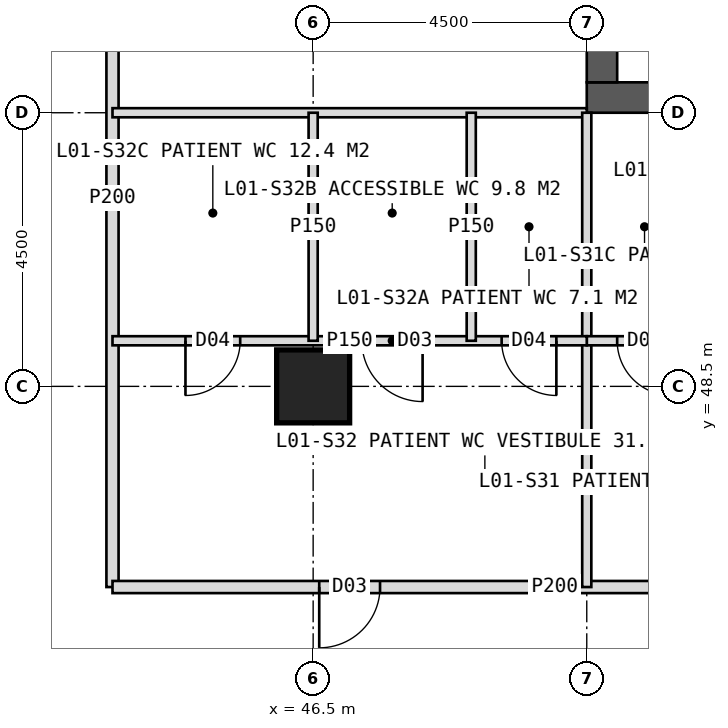
"""IFC4 building model, lengths in metres.
Left out: names, types, materials, properties, quantities, classifications, styles, units other than length and angle.
Written with IfcOpenShell. Run it as: python <this file> out.ifc"""

import sys

from ifc_helpers import new_model, si_unit, direction, frame, frame_2d, origin, origin_2d, place, context, subcontext, project, spatial, rectangle, hollow_rectangle, extrude, element, fill, save


model = new_model("IFC4")
c1 = context("Model", 3, precision=1e-05, world=origin(), true_north=direction((0.0, 1.0)))
c2 = subcontext(c1, "Body", "Model", "MODEL_VIEW")
j1 = project(units=[si_unit("LENGTHUNIT", "METRE"), si_unit("PLANEANGLEUNIT", "RADIAN")], contexts=[c1])
p1 = place(None, origin())
s1 = spatial("IfcSite", under=j1, at=p1, CompositionType="ELEMENT")
p2 = place(p1, origin())
s2 = spatial("IfcBuilding", under=s1, at=p2, CompositionType="ELEMENT")
p3 = place(p2, frame((0.0, 0.0, 6.0)))
s3 = spatial("IfcBuildingStorey", under=s2, at=p3, CompositionType="ELEMENT", Elevation=6.0)
p4 = place(p3, frame((51.0, 53.25, 0.0), z_axis=(0.0, 0.0, 1.0), x_axis=(1.0, 0.0, 0.0)))
e1 = element("IfcWall", 1, at=p4, inside=s3, PredefinedType="SHEAR", context=c2, shape_type="SweptSolid", body=[
    extrude(rectangle(XDim=18.0, YDim=0.5, at=frame_2d((9.0, 0.0))), origin(), (0.0, 0.0, 1.0), 5.0),
])
p5 = place(p4, frame((8.1, 0.0, 0.0)))
e2 = element("IfcOpeningElement", 2, at=p5, cuts=e1, PredefinedType="OPENING", context=c2, shape_type="SweptSolid", body=[
    extrude(rectangle(XDim=1.8, YDim=2.2, at=frame_2d((0.9, 1.1))), frame((0.0, 0.26, 0.0), z_axis=(0.0, -1.0, 0.0), x_axis=(1.0, 0.0, 0.0)), (0.0, 0.0, 1.0), 0.52),
])
p6 = place(p3, frame((51.25, 53.5, 0.0), z_axis=(0.0, 0.0, 1.0), x_axis=(0.0, 1.0, 0.0)))
e3 = element("IfcWall", 3, at=p6, inside=s3, PredefinedType="SHEAR", context=c2, shape_type="SweptSolid", body=[
    extrude(rectangle(XDim=17.0, YDim=0.5, at=frame_2d((8.5, 0.0))), origin(), (0.0, 0.0, 1.0), 5.0),
])
p7 = place(p6, frame((6.0, 0.0, 0.0)))
e4 = element("IfcOpeningElement", 4, at=p7, cuts=e3, PredefinedType="OPENING", context=c2, shape_type="SweptSolid", body=[
    extrude(rectangle(XDim=1.5, YDim=2.2, at=frame_2d((0.75, 1.1))), frame((0.0, 0.26, 0.0), z_axis=(0.0, -1.0, 0.0), x_axis=(1.0, 0.0, 0.0)), (0.0, 0.0, 1.0), 0.52),
])
p8 = place(p3, frame((46.5, 48.5, 0.0), z_axis=(0.0, 0.0, 1.0), x_axis=(1.0, 0.0, 0.0)))
e5 = element("IfcColumn", 5, at=p8, inside=s3, PredefinedType="COLUMN", context=c2, shape_type="SweptSolid", body=[
    extrude(hollow_rectangle(XDim=1.2, YDim=1.2, WallThickness=0.1, at=origin_2d()), origin(), (0.0, 0.0, 1.0), 5.0),
])
p9 = place(p3, frame((43.2, 45.2, 0.0), z_axis=(0.0, 0.0, 1.0), x_axis=(0.0, 1.0, 0.0)))
e6 = element("IfcWall", 6, at=p9, inside=s3, PredefinedType="PARTITIONING", context=c2, shape_type="SweptSolid", body=[
    extrude(rectangle(XDim=12.8, YDim=0.2, at=frame_2d((6.4, 0.0))), origin(), (0.0, 0.0, 1.0), 4.7),
])
p10 = place(p9, frame((9.8, 0.0, 0.0)))
e7 = element("IfcOpeningElement", 7, at=p10, cuts=e6, PredefinedType="OPENING", context=c2, shape_type="SweptSolid", body=[
    extrude(rectangle(XDim=1.0, YDim=2.1, at=frame_2d((0.5, 1.05))), frame((0.0, 0.11, 0.0), z_axis=(0.0, -1.0, 0.0), x_axis=(1.0, 0.0, 0.0)), (0.0, 0.0, 1.0), 0.22),
])
p11 = place(p3, frame((51.0, 53.0, 0.0), z_axis=(0.0, 0.0, 1.0), x_axis=(-1.0, 0.0, 0.0)))
e8 = element("IfcWall", 8, at=p11, inside=s3, PredefinedType="PARTITIONING", context=c2, shape_type="SweptSolid", body=[
    extrude(rectangle(XDim=7.8, YDim=0.15, at=frame_2d((3.9, 0.0))), origin(), (0.0, 0.0, 1.0), 4.7),
])
p12 = place(p3, frame((57.75, 45.2, 0.0), z_axis=(0.0, 0.0, 1.0), x_axis=(-1.0, 0.0, 0.0)))
e9 = element("IfcWall", 9, at=p12, inside=s3, PredefinedType="PARTITIONING", context=c2, shape_type="SweptSolid", body=[
    extrude(rectangle(XDim=14.55, YDim=0.2, at=frame_2d((7.275, 0.0))), origin(), (0.0, 0.0, 1.0), 4.7),
])
p13 = place(p12, frame((2.875, 0.0, 0.0)))
e10 = element("IfcOpeningElement", 10, at=p13, cuts=e9, PredefinedType="OPENING", context=c2, shape_type="SweptSolid", body=[
    extrude(rectangle(XDim=1.0, YDim=2.1, at=frame_2d((0.5, 1.05))), frame((0.0, 0.11, 0.0), z_axis=(0.0, -1.0, 0.0), x_axis=(1.0, 0.0, 0.0)), (0.0, 0.0, 1.0), 0.22),
])
p14 = place(p12, frame((10.15, 0.0, 0.0)))
e11 = element("IfcOpeningElement", 11, at=p14, cuts=e9, PredefinedType="OPENING", context=c2, shape_type="SweptSolid", body=[
    extrude(rectangle(XDim=1.0, YDim=2.1, at=frame_2d((0.5, 1.05))), frame((0.0, 0.11, 0.0), z_axis=(0.0, -1.0, 0.0), x_axis=(1.0, 0.0, 0.0)), (0.0, 0.0, 1.0), 0.22),
])
p15 = place(p3, frame((51.0, 53.0, 0.0), z_axis=(0.0, 0.0, 1.0), x_axis=(0.0, -1.0, 0.0)))
e12 = element("IfcWall", 12, at=p15, inside=s3, PredefinedType="PARTITIONING", context=c2, shape_type="SweptSolid", body=[
    extrude(rectangle(XDim=7.8, YDim=0.15, at=frame_2d((3.9, 0.0))), origin(), (0.0, 0.0, 1.0), 4.7),
])
p16 = place(p3, frame((57.75, 49.25, 0.0), z_axis=(0.0, 0.0, 1.0), x_axis=(-1.0, 0.0, 0.0)))
e13 = element("IfcWall", 13, at=p16, inside=s3, PredefinedType="PARTITIONING", context=c2, shape_type="SweptSolid", body=[
    extrude(rectangle(XDim=6.75, YDim=0.15, at=frame_2d((3.375, 0.0))), origin(), (0.0, 0.0, 1.0), 4.7),
])
p17 = place(p16, frame((0.675, 0.0, 0.0)))
e14 = element("IfcOpeningElement", 14, at=p17, cuts=e13, PredefinedType="OPENING", context=c2, shape_type="SweptSolid", body=[
    extrude(rectangle(XDim=0.9, YDim=2.1, at=frame_2d((0.45, 1.05))), frame((0.0, 0.085, 0.0), z_axis=(0.0, -1.0, 0.0), x_axis=(1.0, 0.0, 0.0)), (0.0, 0.0, 1.0), 0.17),
])
p18 = place(p16, frame((3.05, 0.0, 0.0)))
e15 = element("IfcOpeningElement", 15, at=p18, cuts=e13, PredefinedType="OPENING", context=c2, shape_type="SweptSolid", body=[
    extrude(rectangle(XDim=1.0, YDim=2.1, at=frame_2d((0.5, 1.05))), frame((0.0, 0.085, 0.0), z_axis=(0.0, -1.0, 0.0), x_axis=(1.0, 0.0, 0.0)), (0.0, 0.0, 1.0), 0.17),
])
p19 = place(p16, frame((5.35, 0.0, 0.0)))
e16 = element("IfcOpeningElement", 16, at=p19, cuts=e13, PredefinedType="OPENING", context=c2, shape_type="SweptSolid", body=[
    extrude(rectangle(XDim=0.9, YDim=2.1, at=frame_2d((0.45, 1.05))), frame((0.0, 0.085, 0.0), z_axis=(0.0, -1.0, 0.0), x_axis=(1.0, 0.0, 0.0)), (0.0, 0.0, 1.0), 0.17),
])
p20 = place(p3, frame((51.0, 49.25, 0.0), z_axis=(0.0, 0.0, 1.0), x_axis=(-1.0, 0.0, 0.0)))
e17 = element("IfcWall", 17, at=p20, inside=s3, PredefinedType="PARTITIONING", context=c2, shape_type="SweptSolid", body=[
    extrude(rectangle(XDim=7.8, YDim=0.15, at=frame_2d((3.9, 0.0))), origin(), (0.0, 0.0, 1.0), 4.7),
])
p21 = place(p20, frame((0.5, 0.0, 0.0)))
e18 = element("IfcOpeningElement", 18, at=p21, cuts=e17, PredefinedType="OPENING", context=c2, shape_type="SweptSolid", body=[
    extrude(rectangle(XDim=0.9, YDim=2.1, at=frame_2d((0.45, 1.05))), frame((0.0, 0.085, 0.0), z_axis=(0.0, -1.0, 0.0), x_axis=(1.0, 0.0, 0.0)), (0.0, 0.0, 1.0), 0.17),
])
p22 = place(p20, frame((2.7, 0.0, 0.0)))
e19 = element("IfcOpeningElement", 19, at=p22, cuts=e17, PredefinedType="OPENING", context=c2, shape_type="SweptSolid", body=[
    extrude(rectangle(XDim=1.0, YDim=2.1, at=frame_2d((0.5, 1.05))), frame((0.0, 0.085, 0.0), z_axis=(0.0, -1.0, 0.0), x_axis=(1.0, 0.0, 0.0)), (0.0, 0.0, 1.0), 0.17),
])
p23 = place(p20, frame((5.7, 0.0, 0.0)))
e20 = element("IfcOpeningElement", 20, at=p23, cuts=e17, PredefinedType="OPENING", context=c2, shape_type="SweptSolid", body=[
    extrude(rectangle(XDim=0.9, YDim=2.1, at=frame_2d((0.45, 1.05))), frame((0.0, 0.085, 0.0), z_axis=(0.0, -1.0, 0.0), x_axis=(1.0, 0.0, 0.0)), (0.0, 0.0, 1.0), 0.17),
])
p24 = place(p3, frame((49.1, 53.0, 0.0), z_axis=(0.0, 0.0, 1.0), x_axis=(0.0, -1.0, 0.0)))
e21 = element("IfcWall", 21, at=p24, inside=s3, PredefinedType="PARTITIONING", context=c2, shape_type="SweptSolid", body=[
    extrude(rectangle(XDim=3.75, YDim=0.15, at=frame_2d((1.875, 0.0))), origin(), (0.0, 0.0, 1.0), 4.7),
])
p25 = place(p3, frame((46.5, 53.0, 0.0), z_axis=(0.0, 0.0, 1.0), x_axis=(0.0, -1.0, 0.0)))
e22 = element("IfcWall", 22, at=p25, inside=s3, PredefinedType="PARTITIONING", context=c2, shape_type="SweptSolid", body=[
    extrude(rectangle(XDim=3.75, YDim=0.15, at=frame_2d((1.875, 0.0))), origin(), (0.0, 0.0, 1.0), 3.9),
])
p26 = place(p14, origin())
e23 = element("IfcDoor", 23, at=p26, inside=s3, OperationType="SINGLE_SWING_RIGHT", PredefinedType="DOOR", context=c2, shape_type="SweptSolid", body=[
    extrude(rectangle(XDim=1.0, YDim=2.1, at=frame_2d((0.5, 1.05))), frame((0.0, 0.025, 0.0), z_axis=(0.0, -1.0, 0.0), x_axis=(1.0, 0.0, 0.0)), (0.0, 0.0, 1.0), 0.05),
])
fill(e11, e23)
p27 = place(p19, origin())
e24 = element("IfcDoor", 24, at=p27, inside=s3, OperationType="SINGLE_SWING_LEFT", PredefinedType="DOOR", context=c2, shape_type="SweptSolid", body=[
    extrude(rectangle(XDim=0.9, YDim=2.1, at=frame_2d((0.45, 1.05))), frame((0.0, 0.025, 0.0), z_axis=(0.0, -1.0, 0.0), x_axis=(1.0, 0.0, 0.0)), (0.0, 0.0, 1.0), 0.05),
])
fill(e16, e24)
p28 = place(p21, origin())
e25 = element("IfcDoor", 25, at=p28, inside=s3, OperationType="SINGLE_SWING_LEFT", PredefinedType="DOOR", context=c2, shape_type="SweptSolid", body=[
    extrude(rectangle(XDim=0.9, YDim=2.1, at=frame_2d((0.45, 1.05))), frame((0.0, 0.025, 0.0), z_axis=(0.0, -1.0, 0.0), x_axis=(1.0, 0.0, 0.0)), (0.0, 0.0, 1.0), 0.05),
])
fill(e18, e25)
p29 = place(p22, origin())
e26 = element("IfcDoor", 26, at=p29, inside=s3, OperationType="SINGLE_SWING_LEFT", PredefinedType="DOOR", context=c2, shape_type="SweptSolid", body=[
    extrude(rectangle(XDim=1.0, YDim=2.1, at=frame_2d((0.5, 1.05))), frame((0.0, 0.025, 0.0), z_axis=(0.0, -1.0, 0.0), x_axis=(1.0, 0.0, 0.0)), (0.0, 0.0, 1.0), 0.05),
])
fill(e19, e26)
p30 = place(p23, origin())
e27 = element("IfcDoor", 27, at=p30, inside=s3, OperationType="SINGLE_SWING_RIGHT", PredefinedType="DOOR", context=c2, shape_type="SweptSolid", body=[
    extrude(rectangle(XDim=0.9, YDim=2.1, at=frame_2d((0.45, 1.05))), frame((0.0, 0.025, 0.0), z_axis=(0.0, -1.0, 0.0), x_axis=(1.0, 0.0, 0.0)), (0.0, 0.0, 1.0), 0.05),
])
fill(e20, e27)
save(model, sys.argv[1])
